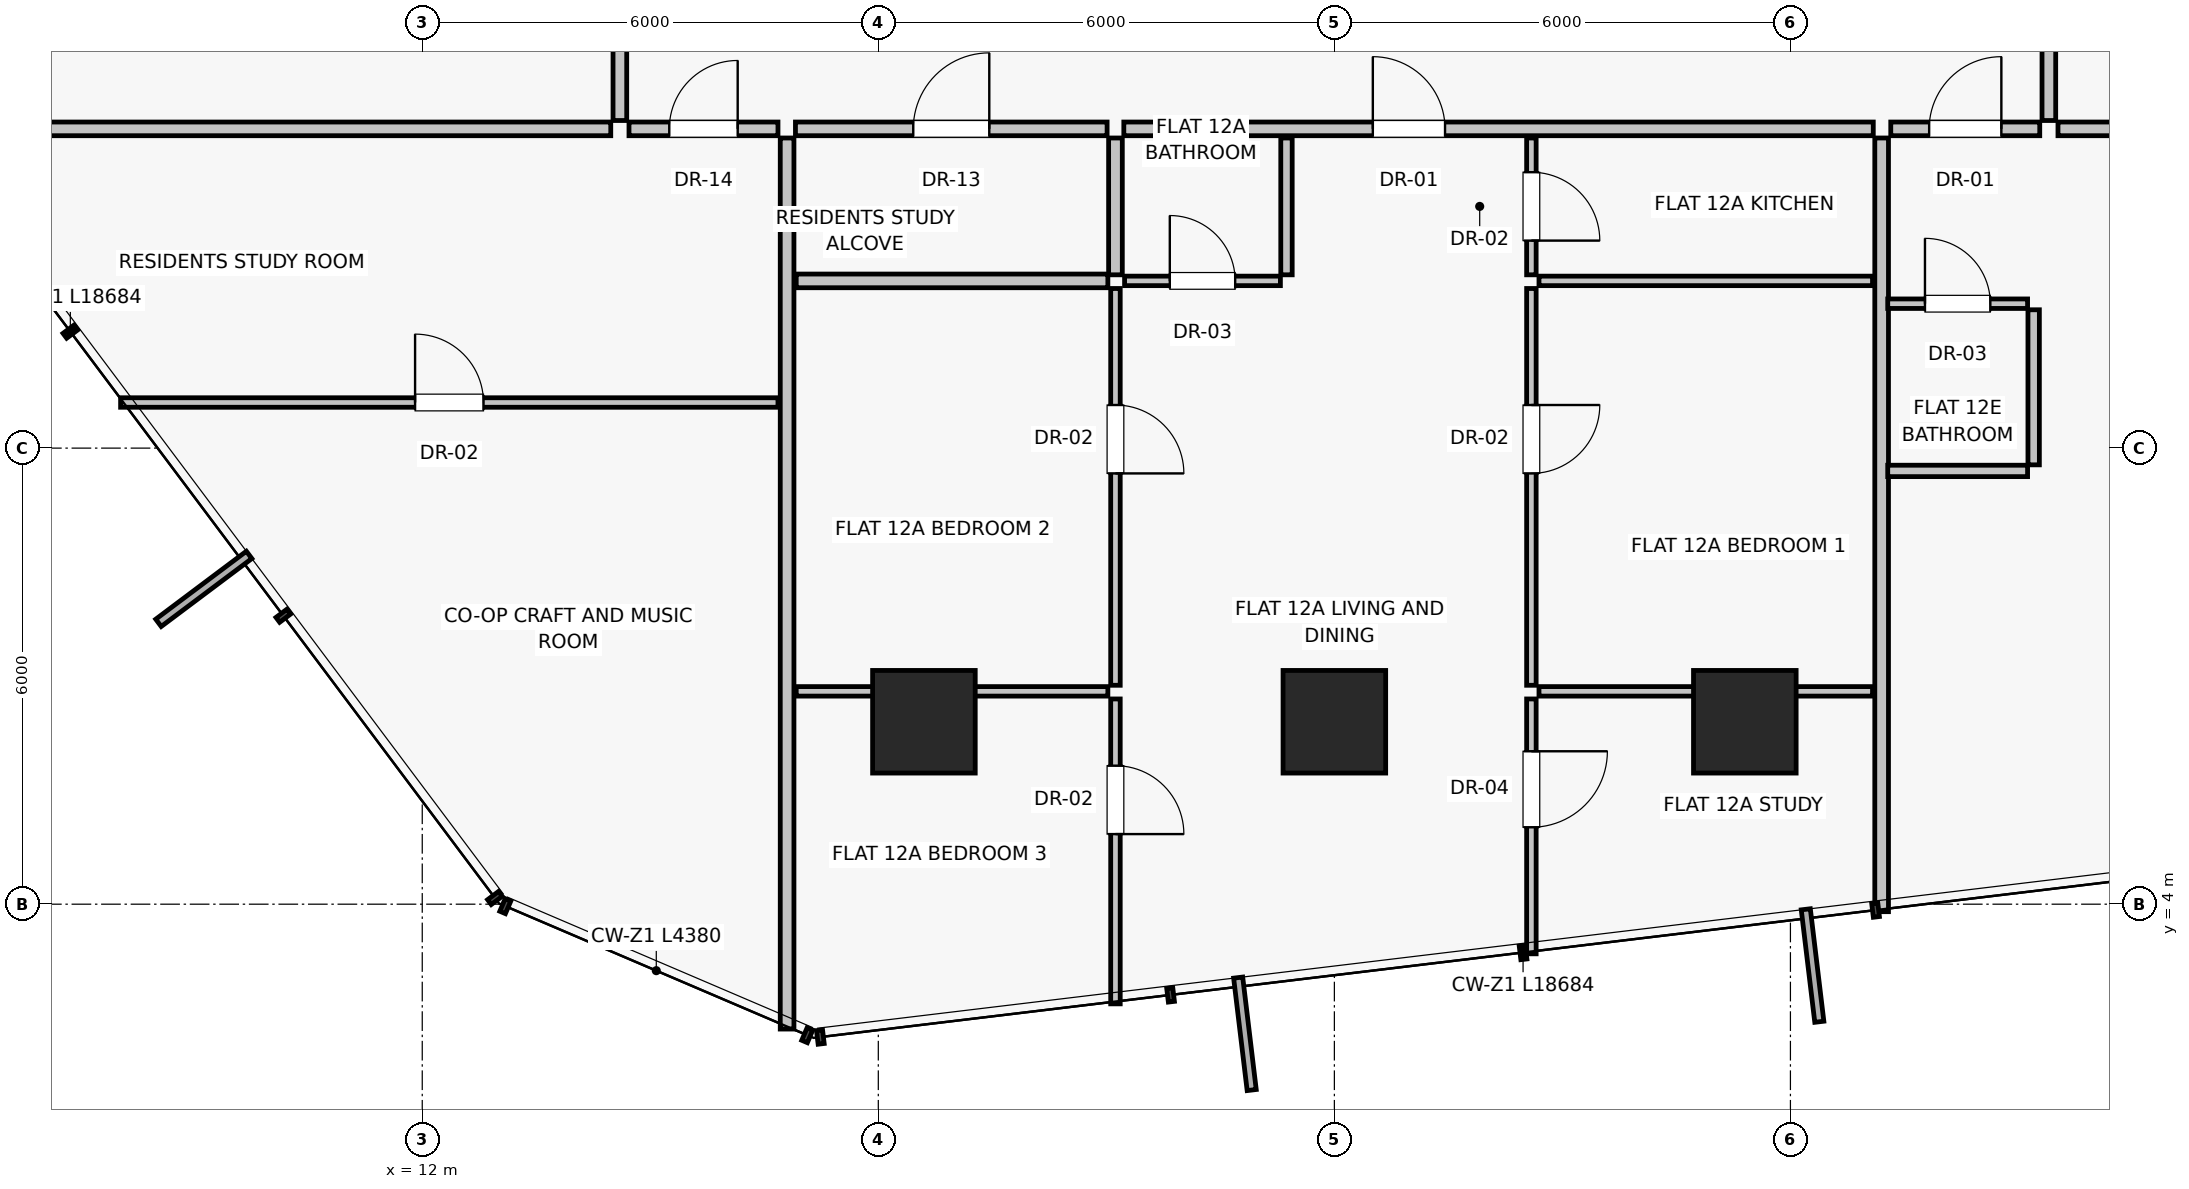
"""IFC4 building model, lengths in metres.
Left out: names, types, materials, properties, quantities, classifications, styles, units other than length and angle.
Written with IfcOpenShell. Run it as: python <this file> out.ifc"""

import sys

from ifc_helpers import new_model, si_unit, direction, frame, frame_2d, origin, origin_2d, place, context, subcontext, project, spatial, rectangle, extrude, source, transform, mapped, element, fill, save


model = new_model("IFC4")
c1 = context("Model", 3, precision=1e-05, world=origin(), true_north=direction((0.0, 1.0)))
c2 = subcontext(c1, "Body", "Model", "MODEL_VIEW")
j1 = project(units=[si_unit("LENGTHUNIT", "METRE"), si_unit("PLANEANGLEUNIT", "RADIAN")], contexts=[c1])
p1 = place(None, origin())
s1 = spatial("IfcSite", under=j1, at=p1, CompositionType="ELEMENT")
p2 = place(p1, origin())
s2 = spatial("IfcBuilding", under=s1, at=p2, CompositionType="ELEMENT")
p3 = place(p2, frame((0.0, 0.0, 46.8)))
s3 = spatial("IfcBuildingStorey", under=s2, at=p3, CompositionType="ELEMENT", Elevation=46.8)
for number, where, z_axis, x_axis in (
    (1, (18.6, 6.4, 0.0), (0.0, 0.0, 1.0), (1.0, 0.0, 0.0)),
    (2, (24.0, 6.4, 0.0), (0.0, 0.0, 1.0), (1.0, 0.0, 0.0)),
    (3, (29.4, 6.4, 0.0), (0.0, 0.0, 1.0), (1.0, 0.0, 0.0)),
):
    element("IfcColumn", number, at=place(p3, frame(where, z_axis=z_axis, x_axis=x_axis)), inside=s3, PredefinedType="COLUMN", context=c2, shape_type="SweptSolid", body=[
        extrude(rectangle(XDim=1.35, YDim=1.35, at=origin_2d()), origin(), (0.0, 0.0, 1.0), 3.25),
    ])
p4 = place(p3, frame((16.8, 14.08, 0.0), z_axis=(0.0, 0.0, 1.0), x_axis=(0.0, -1.0, 0.0)))
e4 = element("IfcWall", 4, at=p4, inside=s3, PredefinedType="PARTITIONING", context=c2, shape_type="SweptSolid", body=[
    extrude(rectangle(XDim=11.723, YDim=0.18, at=frame_2d((5.861, 0.0))), origin(), (0.0, 0.0, 1.0), 3.0),
])
p5 = place(p3, frame((31.2, 14.08, 0.0), z_axis=(0.0, 0.0, 1.0), x_axis=(0.0, -1.0, 0.0)))
e5 = element("IfcWall", 5, at=p5, inside=s3, PredefinedType="PARTITIONING", context=c2, shape_type="SweptSolid", body=[
    extrude(rectangle(XDim=10.178, YDim=0.18, at=frame_2d((5.089, 0.0))), origin(), (0.0, 0.0, 1.0), 3.0),
])
p6 = place(p3, frame((16.91, 14.2, 0.0), z_axis=(0.0, 0.0, 1.0), x_axis=(1.0, 0.0, 0.0)))
e6 = element("IfcWall", 6, at=p6, inside=s3, PredefinedType="PARTITIONING", context=c2, shape_type="SweptSolid", body=[
    extrude(rectangle(XDim=4.1, YDim=0.18, at=frame_2d((2.05, 0.0))), origin(), (0.0, 0.0, 1.0), 3.0),
])
p7 = place(p6, frame((1.55, 0.0, 0.0)))
e7 = element("IfcOpeningElement", 7, at=p7, cuts=e6, PredefinedType="OPENING", context=c2, shape_type="SweptSolid", body=[
    extrude(rectangle(XDim=1.0, YDim=2.01, at=frame_2d((0.5, 1.005))), frame((0.0, 0.1, 0.0), z_axis=(0.0, -1.0, 0.0), x_axis=(1.0, 0.0, 0.0)), (0.0, 0.0, 1.0), 0.2),
])
p8 = place(p3, frame((21.23, 14.2, 0.0), z_axis=(0.0, 0.0, 1.0), x_axis=(1.0, 0.0, 0.0)))
e8 = element("IfcWall", 8, at=p8, inside=s3, PredefinedType="PARTITIONING", context=c2, shape_type="SweptSolid", body=[
    extrude(rectangle(XDim=9.86, YDim=0.18, at=frame_2d((4.93, 0.0))), origin(), (0.0, 0.0, 1.0), 3.0),
])
p9 = place(p8, frame((3.276, 0.0, 0.0)))
e9 = element("IfcOpeningElement", 9, at=p9, cuts=e8, PredefinedType="OPENING", context=c2, shape_type="SweptSolid", body=[
    extrude(rectangle(XDim=0.95, YDim=2.02, at=frame_2d((0.475, 1.01))), frame((0.0, 0.1, 0.0), z_axis=(0.0, -1.0, 0.0), x_axis=(1.0, 0.0, 0.0)), (0.0, 0.0, 1.0), 0.2),
])
p10 = place(p3, frame((16.92, 6.8, 0.0), z_axis=(0.0, 0.0, 1.0), x_axis=(1.0, 0.0, 0.0)))
e10 = element("IfcWall", 10, at=p10, inside=s3, PredefinedType="PARTITIONING", context=c2, shape_type="SweptSolid", body=[
    extrude(rectangle(XDim=4.1, YDim=0.125, at=frame_2d((2.05, 0.0))), origin(), (0.0, 0.0, 1.0), 2.1),
])
p11 = place(p3, frame((21.12, 6.7, 0.0), z_axis=(0.0, 0.0, 1.0), x_axis=(0.0, -1.0, 0.0)))
e11 = element("IfcWall", 11, at=p11, inside=s3, PredefinedType="PARTITIONING", context=c2, shape_type="SweptSolid", body=[
    extrude(rectangle(XDim=4.011, YDim=0.125, at=frame_2d((2.006, 0.0))), origin(), (0.0, 0.0, 1.0), 3.0),
])
p12 = place(p11, frame((0.878, 0.0, 0.0)))
e12 = element("IfcOpeningElement", 12, at=p12, cuts=e11, PredefinedType="OPENING", context=c2, shape_type="SweptSolid", body=[
    extrude(rectangle(XDim=0.9, YDim=2.01, at=frame_2d((0.45, 1.005))), frame((0.0, 0.073, 0.0), z_axis=(0.0, -1.0, 0.0), x_axis=(1.0, 0.0, 0.0)), (0.0, 0.0, 1.0), 0.145),
])
p13 = place(p3, frame((26.692, 6.8, 0.0), z_axis=(0.0, 0.0, 1.0), x_axis=(1.0, 0.0, 0.0)))
e13 = element("IfcWall", 13, at=p13, inside=s3, PredefinedType="PARTITIONING", context=c2, shape_type="SweptSolid", body=[
    extrude(rectangle(XDim=4.388, YDim=0.125, at=frame_2d((2.194, 0.0))), origin(), (0.0, 0.0, 1.0), 2.1),
])
p14 = place(p3, frame((26.592, 6.7, 0.0), z_axis=(0.0, 0.0, 1.0), x_axis=(0.0, -1.0, 0.0)))
e14 = element("IfcWall", 14, at=p14, inside=s3, PredefinedType="PARTITIONING", context=c2, shape_type="SweptSolid", body=[
    extrude(rectangle(XDim=3.353, YDim=0.125, at=frame_2d((1.676, 0.0))), origin(), (0.0, 0.0, 1.0), 3.0),
])
p15 = place(p14, frame((0.688, 0.0, 0.0)))
e15 = element("IfcOpeningElement", 15, at=p15, cuts=e14, PredefinedType="OPENING", context=c2, shape_type="SweptSolid", body=[
    extrude(rectangle(XDim=1.0, YDim=2.01, at=frame_2d((0.5, 1.005))), frame((0.0, 0.073, 0.0), z_axis=(0.0, -1.0, 0.0), x_axis=(1.0, 0.0, 0.0)), (0.0, 0.0, 1.0), 0.145),
])
p16 = place(p3, frame((16.92, 12.2, 0.0), z_axis=(0.0, 0.0, 1.0), x_axis=(1.0, 0.0, 0.0)))
e16 = element("IfcWall", 16, at=p16, inside=s3, PredefinedType="PARTITIONING", context=c2, shape_type="SweptSolid", body=[
    extrude(rectangle(XDim=4.1, YDim=0.18, at=frame_2d((2.05, 0.0))), origin(), (0.0, 0.0, 1.0), 3.0),
])
p17 = place(p3, frame((21.12, 14.08, 0.0), z_axis=(0.0, 0.0, 1.0), x_axis=(0.0, -1.0, 0.0)))
e17 = element("IfcWall", 17, at=p17, inside=s3, PredefinedType="PARTITIONING", context=c2, shape_type="SweptSolid", body=[
    extrude(rectangle(XDim=1.8, YDim=0.18, at=frame_2d((0.9, 0.0))), origin(), (0.0, 0.0, 1.0), 3.0),
])
p18 = place(p3, frame((21.12, 12.1, 0.0), z_axis=(0.0, 0.0, 1.0), x_axis=(0.0, -1.0, 0.0)))
e18 = element("IfcWall", 18, at=p18, inside=s3, PredefinedType="PARTITIONING", context=c2, shape_type="SweptSolid", body=[
    extrude(rectangle(XDim=5.22, YDim=0.125, at=frame_2d((2.61, 0.0))), origin(), (0.0, 0.0, 1.0), 3.0),
])
p19 = place(p18, frame((1.533, 0.0, 0.0)))
e19 = element("IfcOpeningElement", 19, at=p19, cuts=e18, PredefinedType="OPENING", context=c2, shape_type="SweptSolid", body=[
    extrude(rectangle(XDim=0.9, YDim=2.01, at=frame_2d((0.45, 1.005))), frame((0.0, 0.073, 0.0), z_axis=(0.0, -1.0, 0.0), x_axis=(1.0, 0.0, 0.0)), (0.0, 0.0, 1.0), 0.145),
])
p20 = place(p3, frame((23.37, 14.08, 0.0), z_axis=(0.0, 0.0, 1.0), x_axis=(0.0, -1.0, 0.0)))
e20 = element("IfcWall", 20, at=p20, inside=s3, PredefinedType="PARTITIONING", context=c2, shape_type="SweptSolid", body=[
    extrude(rectangle(XDim=1.8, YDim=0.15, at=frame_2d((0.9, 0.0))), origin(), (0.0, 0.0, 1.0), 3.0),
])
p21 = place(p3, frame((21.24, 12.2, 0.0), z_axis=(0.0, 0.0, 1.0), x_axis=(1.0, 0.0, 0.0)))
e21 = element("IfcWall", 21, at=p21, inside=s3, PredefinedType="PARTITIONING", context=c2, shape_type="SweptSolid", body=[
    extrude(rectangle(XDim=2.05, YDim=0.125, at=frame_2d((1.025, 0.0))), origin(), (0.0, 0.0, 1.0), 3.0),
])
p22 = place(p21, frame((0.595, 0.0, 0.0)))
e22 = element("IfcOpeningElement", 22, at=p22, cuts=e21, PredefinedType="OPENING", context=c2, shape_type="SweptSolid", body=[
    extrude(rectangle(XDim=0.86, YDim=2.01, at=frame_2d((0.43, 1.005))), frame((0.0, 0.073, 0.0), z_axis=(0.0, -1.0, 0.0), x_axis=(1.0, 0.0, 0.0)), (0.0, 0.0, 1.0), 0.145),
])
p23 = place(p3, frame((26.592, 14.08, 0.0), z_axis=(0.0, 0.0, 1.0), x_axis=(0.0, -1.0, 0.0)))
e23 = element("IfcWall", 23, at=p23, inside=s3, PredefinedType="PARTITIONING", context=c2, shape_type="SweptSolid", body=[
    extrude(rectangle(XDim=1.8, YDim=0.125, at=frame_2d((0.9, 0.0))), origin(), (0.0, 0.0, 1.0), 3.0),
])
p24 = place(p23, frame((0.45, 0.0, 0.0)))
e24 = element("IfcOpeningElement", 24, at=p24, cuts=e23, PredefinedType="OPENING", context=c2, shape_type="SweptSolid", body=[
    extrude(rectangle(XDim=0.9, YDim=2.01, at=frame_2d((0.45, 1.005))), frame((0.0, 0.073, 0.0), z_axis=(0.0, -1.0, 0.0), x_axis=(1.0, 0.0, 0.0)), (0.0, 0.0, 1.0), 0.145),
])
p25 = place(p3, frame((26.692, 12.2, 0.0), z_axis=(0.0, 0.0, 1.0), x_axis=(1.0, 0.0, 0.0)))
e25 = element("IfcWall", 25, at=p25, inside=s3, PredefinedType="PARTITIONING", context=c2, shape_type="SweptSolid", body=[
    extrude(rectangle(XDim=4.388, YDim=0.125, at=frame_2d((2.194, 0.0))), origin(), (0.0, 0.0, 1.0), 3.0),
])
p26 = place(p3, frame((26.592, 12.1, 0.0), z_axis=(0.0, 0.0, 1.0), x_axis=(0.0, -1.0, 0.0)))
e26 = element("IfcWall", 26, at=p26, inside=s3, PredefinedType="PARTITIONING", context=c2, shape_type="SweptSolid", body=[
    extrude(rectangle(XDim=5.22, YDim=0.125, at=frame_2d((2.61, 0.0))), origin(), (0.0, 0.0, 1.0), 3.0),
])
p27 = place(p26, frame((1.533, 0.0, 0.0)))
e27 = element("IfcOpeningElement", 27, at=p27, cuts=e26, PredefinedType="OPENING", context=c2, shape_type="SweptSolid", body=[
    extrude(rectangle(XDim=0.9, YDim=2.01, at=frame_2d((0.45, 1.005))), frame((0.0, 0.073, 0.0), z_axis=(0.0, -1.0, 0.0), x_axis=(1.0, 0.0, 0.0)), (0.0, 0.0, 1.0), 0.145),
])
p28 = place(p3, frame((14.48, 14.2, 0.0), z_axis=(0.0, 0.0, 1.0), x_axis=(-1.0, 0.0, 0.0)))
e28 = element("IfcWall", 28, at=p28, inside=s3, PredefinedType="PARTITIONING", context=c2, shape_type="SweptSolid", body=[
    extrude(rectangle(XDim=9.147, YDim=0.18, at=frame_2d((4.574, 0.0))), origin(), (0.0, 0.0, 1.0), 3.0),
])
p29 = place(p3, frame((14.6, 14.31, 0.0), z_axis=(0.0, 0.0, 1.0), x_axis=(0.0, 1.0, 0.0)))
e29 = element("IfcWall", 29, at=p29, inside=s3, PredefinedType="PARTITIONING", context=c2, shape_type="SweptSolid", body=[
    extrude(rectangle(XDim=4.267, YDim=0.18, at=frame_2d((2.133, 0.0))), origin(), (0.0, 0.0, 1.0), 3.0),
])
p30 = place(p29, frame((1.634, 0.0, 0.0)))
e30 = element("IfcOpeningElement", 30, at=p30, cuts=e29, PredefinedType="OPENING", context=c2, shape_type="SweptSolid", body=[
    extrude(rectangle(XDim=1.0, YDim=2.01, at=frame_2d((0.5, 1.005))), frame((0.0, 0.1, 0.0), z_axis=(0.0, -1.0, 0.0), x_axis=(1.0, 0.0, 0.0)), (0.0, 0.0, 1.0), 0.2),
])
p31 = place(p3, frame((33.52, 14.2, 0.0), z_axis=(0.0, 0.0, 1.0), x_axis=(1.0, 0.0, 0.0)))
e31 = element("IfcWall", 31, at=p31, inside=s3, PredefinedType="PARTITIONING", context=c2, shape_type="SweptSolid", body=[
    extrude(rectangle(XDim=8.927, YDim=0.18, at=frame_2d((4.464, 0.0))), origin(), (0.0, 0.0, 1.0), 3.0),
])
p32 = place(p3, frame((33.4, 14.31, 0.0), z_axis=(0.0, 0.0, 1.0), x_axis=(0.0, 1.0, 0.0)))
e32 = element("IfcWall", 32, at=p32, inside=s3, PredefinedType="PARTITIONING", context=c2, shape_type="SweptSolid", body=[
    extrude(rectangle(XDim=12.108, YDim=0.18, at=frame_2d((6.054, 0.0))), origin(), (0.0, 0.0, 1.0), 3.0),
])
p33 = place(p32, frame((3.93, 0.0, 0.0)))
e33 = element("IfcOpeningElement", 33, at=p33, cuts=e32, PredefinedType="OPENING", context=c2, shape_type="SweptSolid", body=[
    extrude(rectangle(XDim=0.95, YDim=2.02, at=frame_2d((0.475, 1.01))), frame((0.0, 0.1, 0.0), z_axis=(0.0, -1.0, 0.0), x_axis=(1.0, 0.0, 0.0)), (0.0, 0.0, 1.0), 0.2),
])
p34 = place(p3, frame((14.72, 14.2, 0.0), z_axis=(0.0, 0.0, 1.0), x_axis=(1.0, 0.0, 0.0)))
e34 = element("IfcWall", 34, at=p34, inside=s3, PredefinedType="PARTITIONING", context=c2, shape_type="SweptSolid", body=[
    extrude(rectangle(XDim=1.96, YDim=0.18, at=frame_2d((0.98, 0.0))), origin(), (0.0, 0.0, 1.0), 3.0),
])
p35 = place(p34, frame((0.53, 0.0, 0.0)))
e35 = element("IfcOpeningElement", 35, at=p35, cuts=e34, PredefinedType="OPENING", context=c2, shape_type="SweptSolid", body=[
    extrude(rectangle(XDim=0.9, YDim=2.01, at=frame_2d((0.45, 1.005))), frame((0.0, 0.1, 0.0), z_axis=(0.0, -1.0, 0.0), x_axis=(1.0, 0.0, 0.0)), (0.0, 0.0, 1.0), 0.2),
])
p36 = place(p3, frame((8.031, 10.6, 0.0), z_axis=(0.0, 0.0, 1.0), x_axis=(1.0, 0.0, 0.0)))
e36 = element("IfcWall", 36, at=p36, inside=s3, PredefinedType="PARTITIONING", context=c2, shape_type="SweptSolid", body=[
    extrude(rectangle(XDim=8.648, YDim=0.125, at=frame_2d((4.324, 0.0))), origin(), (0.0, 0.0, 1.0), 3.0),
])
p37 = place(p36, frame((3.874, 0.0, 0.0)))
e37 = element("IfcOpeningElement", 37, at=p37, cuts=e36, PredefinedType="OPENING", context=c2, shape_type="SweptSolid", body=[
    extrude(rectangle(XDim=0.9, YDim=2.01, at=frame_2d((0.45, 1.005))), frame((0.0, 0.073, 0.0), z_axis=(0.0, -1.0, 0.0), x_axis=(1.0, 0.0, 0.0)), (0.0, 0.0, 1.0), 0.145),
])
p38 = place(p3, frame((31.32, 14.2, 0.0), z_axis=(0.0, 0.0, 1.0), x_axis=(1.0, 0.0, 0.0)))
e38 = element("IfcWall", 38, at=p38, inside=s3, PredefinedType="PARTITIONING", context=c2, shape_type="SweptSolid", body=[
    extrude(rectangle(XDim=1.96, YDim=0.18, at=frame_2d((0.98, 0.0))), origin(), (0.0, 0.0, 1.0), 3.0),
])
p39 = place(p38, frame((0.505, 0.0, 0.0)))
e39 = element("IfcOpeningElement", 39, at=p39, cuts=e38, PredefinedType="OPENING", context=c2, shape_type="SweptSolid", body=[
    extrude(rectangle(XDim=0.95, YDim=2.02, at=frame_2d((0.475, 1.01))), frame((0.0, 0.1, 0.0), z_axis=(0.0, -1.0, 0.0), x_axis=(1.0, 0.0, 0.0)), (0.0, 0.0, 1.0), 0.2),
])
p40 = place(p3, frame((31.28, 11.9, 0.0), z_axis=(0.0, 0.0, 1.0), x_axis=(1.0, 0.0, 0.0)))
e40 = element("IfcWall", 40, at=p40, inside=s3, PredefinedType="PARTITIONING", context=c2, shape_type="SweptSolid", body=[
    extrude(rectangle(XDim=1.84, YDim=0.125, at=frame_2d((0.92, 0.0))), origin(), (0.0, 0.0, 1.0), 3.0),
])
p41 = place(p40, frame((0.49, 0.0, 0.0)))
e41 = element("IfcOpeningElement", 41, at=p41, cuts=e40, PredefinedType="OPENING", context=c2, shape_type="SweptSolid", body=[
    extrude(rectangle(XDim=0.86, YDim=2.01, at=frame_2d((0.43, 1.005))), frame((0.0, 0.073, 0.0), z_axis=(0.0, -1.0, 0.0), x_axis=(1.0, 0.0, 0.0)), (0.0, 0.0, 1.0), 0.145),
])
p42 = place(p3, frame((31.28, 9.7, 0.0), z_axis=(0.0, 0.0, 1.0), x_axis=(1.0, 0.0, 0.0)))
e42 = element("IfcWall", 42, at=p42, inside=s3, PredefinedType="PARTITIONING", context=c2, shape_type="SweptSolid", body=[
    extrude(rectangle(XDim=1.84, YDim=0.15, at=frame_2d((0.92, 0.0))), origin(), (0.0, 0.0, 1.0), 3.0),
])
p43 = place(p3, frame((33.2, 9.78, 0.0), z_axis=(0.0, 0.0, 1.0), x_axis=(0.0, 1.0, 0.0)))
e43 = element("IfcWall", 43, at=p43, inside=s3, PredefinedType="PARTITIONING", context=c2, shape_type="SweptSolid", body=[
    extrude(rectangle(XDim=2.04, YDim=0.15, at=frame_2d((1.02, 0.0))), origin(), (0.0, 0.0, 1.0), 3.0),
])
m1 = source(origin(), c2, "Body", "SweptSolid", [
    extrude(rectangle(XDim=1.0, YDim=2.01, at=frame_2d((0.5, 1.005))), frame((0.0, 0.025, 0.0), z_axis=(0.0, -1.0, 0.0), x_axis=(1.0, 0.0, 0.0)), (0.0, 0.0, 1.0), 0.05),
])
p44 = place(p7, origin())
e44 = element("IfcDoor", 44, at=p44, inside=s3, OperationType="SINGLE_SWING_RIGHT", PredefinedType="DOOR", context=c2, shape_type="MappedRepresentation", body=[
    mapped(m1, transform((0.0, 0.0, 0.0), scale=1.0)),
])
fill(e7, e44)
m2 = source(origin(), c2, "Body", "SweptSolid", [
    extrude(rectangle(XDim=0.95, YDim=2.02, at=frame_2d((0.475, 1.01))), frame((0.0, 0.025, 0.0), z_axis=(0.0, -1.0, 0.0), x_axis=(1.0, 0.0, 0.0)), (0.0, 0.0, 1.0), 0.05),
])
p45 = place(p9, origin())
e45 = element("IfcDoor", 45, at=p45, inside=s3, OperationType="SINGLE_SWING_LEFT", PredefinedType="DOOR", context=c2, shape_type="MappedRepresentation", body=[
    mapped(m2, transform((0.0, 0.0, 0.0), scale=1.0)),
])
fill(e9, e45)
m3 = source(origin(), c2, "Body", "SweptSolid", [
    extrude(rectangle(XDim=0.9, YDim=2.01, at=frame_2d((0.45, 1.005))), frame((0.0, 0.025, 0.0), z_axis=(0.0, -1.0, 0.0), x_axis=(1.0, 0.0, 0.0)), (0.0, 0.0, 1.0), 0.05),
])
p46 = place(p12, origin())
e46 = element("IfcDoor", 46, at=p46, inside=s3, OperationType="SINGLE_SWING_RIGHT", PredefinedType="DOOR", context=c2, shape_type="MappedRepresentation", body=[
    mapped(m3, transform((0.0, 0.0, 0.0), scale=1.0)),
])
fill(e12, e46)
p47 = place(p15, origin())
e47 = element("IfcDoor", 47, at=p47, inside=s3, OperationType="SINGLE_SWING_LEFT", PredefinedType="DOOR", context=c2, shape_type="MappedRepresentation", body=[
    mapped(m1, transform((0.0, 0.0, 0.0), scale=1.0)),
])
fill(e15, e47)
p48 = place(p19, origin())
e48 = element("IfcDoor", 48, at=p48, inside=s3, OperationType="SINGLE_SWING_RIGHT", PredefinedType="DOOR", context=c2, shape_type="MappedRepresentation", body=[
    mapped(m3, transform((0.0, 0.0, 0.0), scale=1.0)),
])
fill(e19, e48)
m4 = source(origin(), c2, "Body", "SweptSolid", [
    extrude(rectangle(XDim=0.86, YDim=2.01, at=frame_2d((0.43, 1.005))), frame((0.0, 0.025, 0.0), z_axis=(0.0, -1.0, 0.0), x_axis=(1.0, 0.0, 0.0)), (0.0, 0.0, 1.0), 0.05),
])
p49 = place(p22, origin())
e49 = element("IfcDoor", 49, at=p49, inside=s3, OperationType="SINGLE_SWING_LEFT", PredefinedType="DOOR", context=c2, shape_type="MappedRepresentation", body=[
    mapped(m4, transform((0.0, 0.0, 0.0), scale=1.0)),
])
fill(e22, e49)
p50 = place(p24, origin())
e50 = element("IfcDoor", 50, at=p50, inside=s3, OperationType="SINGLE_SWING_RIGHT", PredefinedType="DOOR", context=c2, shape_type="MappedRepresentation", body=[
    mapped(m3, transform((0.0, 0.0, 0.0), scale=1.0)),
])
fill(e24, e50)
p51 = place(p27, origin())
e51 = element("IfcDoor", 51, at=p51, inside=s3, OperationType="SINGLE_SWING_LEFT", PredefinedType="DOOR", context=c2, shape_type="MappedRepresentation", body=[
    mapped(m3, transform((0.0, 0.0, 0.0), scale=1.0)),
])
fill(e27, e51)
p52 = place(p35, origin())
e52 = element("IfcDoor", 52, at=p52, inside=s3, OperationType="SINGLE_SWING_RIGHT", PredefinedType="DOOR", context=c2, shape_type="MappedRepresentation", body=[
    mapped(m3, transform((0.0, 0.0, 0.0), scale=1.0)),
])
fill(e35, e52)
p53 = place(p37, origin())
e53 = element("IfcDoor", 53, at=p53, inside=s3, OperationType="SINGLE_SWING_LEFT", PredefinedType="DOOR", context=c2, shape_type="MappedRepresentation", body=[
    mapped(m3, transform((0.0, 0.0, 0.0), scale=1.0)),
])
fill(e37, e53)
p54 = place(p39, origin())
e54 = element("IfcDoor", 54, at=p54, inside=s3, OperationType="SINGLE_SWING_RIGHT", PredefinedType="DOOR", context=c2, shape_type="MappedRepresentation", body=[
    mapped(m2, transform((0.0, 0.0, 0.0), scale=1.0)),
])
fill(e39, e54)
p55 = place(p41, origin())
e55 = element("IfcDoor", 55, at=p55, inside=s3, OperationType="SINGLE_SWING_LEFT", PredefinedType="DOOR", context=c2, shape_type="MappedRepresentation", body=[
    mapped(m4, transform((0.0, 0.0, 0.0), scale=1.0)),
])
fill(e41, e55)
save(model, sys.argv[1])
